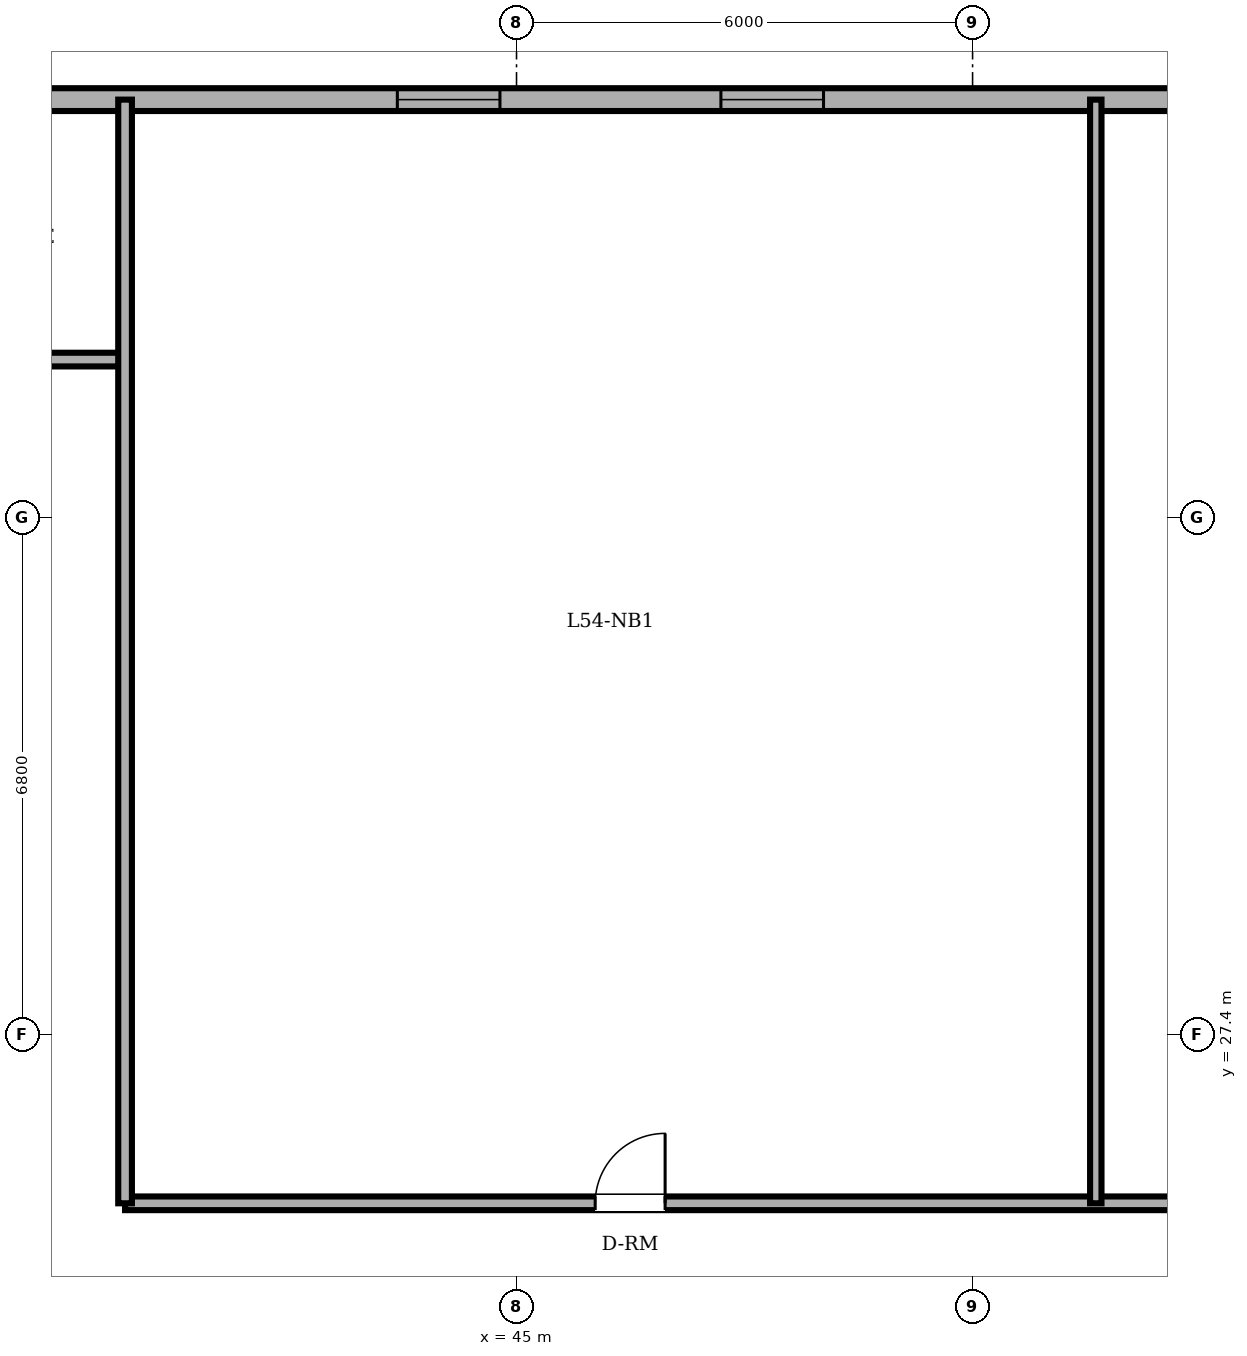
"""IFC4 building model, lengths in metres.
Left out: names, types, materials, properties, quantities, classifications, styles, units other than length and angle.
Written with IfcOpenShell. Run it as: python <this file> out.ifc"""

import sys

from ifc_helpers import new_model, si_unit, direction, frame, frame_2d, origin, place, context, subcontext, project, spatial, rectangle, extrude, element, fill, save


model = new_model("IFC4")
c1 = context("Model", 3, precision=1e-05, world=origin(), true_north=direction((0.0, 1.0)))
c2 = subcontext(c1, "Body", "Model", "MODEL_VIEW")
j1 = project(units=[si_unit("LENGTHUNIT", "METRE"), si_unit("PLANEANGLEUNIT", "RADIAN")], contexts=[c1])
p1 = place(None, origin())
s1 = spatial("IfcSite", under=j1, at=p1, CompositionType="ELEMENT")
p2 = place(p1, origin())
s2 = spatial("IfcBuilding", under=s1, at=p2, CompositionType="ELEMENT")
p3 = place(p2, frame((0.0, 0.0, 208.5)))
s3 = spatial("IfcBuildingStorey", under=s2, at=p3, CompositionType="ELEMENT", Elevation=208.5)
p4 = place(p3, frame((54.885, 39.7, 0.0), z_axis=(0.0, 0.0, 1.0), x_axis=(-1.0, 0.0, 0.0)))
e1 = element("IfcWall", 1, at=p4, inside=s3, PredefinedType="SOLIDWALL", context=c2, shape_type="SweptSolid", body=[
    extrude(rectangle(XDim=32.485, YDim=0.3, at=frame_2d((16.243, 0.0))), origin(), (0.0, 0.0, 1.0), 3.4),
])
p5 = place(p4, frame((27.01, 0.0, 0.0)))
e2 = element("IfcOpeningElement", 2, at=p5, cuts=e1, PredefinedType="OPENING", context=c2, shape_type="SweptSolid", body=[
    extrude(rectangle(XDim=0.95, YDim=2.2, at=frame_2d((0.475, 1.1))), frame((0.0, 0.16, 0.0), z_axis=(0.0, -1.0, 0.0), x_axis=(1.0, 0.0, 0.0)), (0.0, 0.0, 1.0), 0.32),
])
p6 = place(p4, frame((5.846, 0.0, 0.85)))
e3 = element("IfcOpeningElement", 3, at=p6, cuts=e1, PredefinedType="OPENING", context=c2, shape_type="SweptSolid", body=[
    extrude(rectangle(XDim=1.35, YDim=1.55, at=frame_2d((0.675, 0.775))), frame((0.0, 0.16, 0.0), z_axis=(0.0, -1.0, 0.0), x_axis=(1.0, 0.0, 0.0)), (0.0, 0.0, 1.0), 0.32),
])
p7 = place(p4, frame((10.103, 0.0, 0.85)))
e4 = element("IfcOpeningElement", 4, at=p7, cuts=e1, PredefinedType="OPENING", context=c2, shape_type="SweptSolid", body=[
    extrude(rectangle(XDim=1.35, YDim=1.55, at=frame_2d((0.675, 0.775))), frame((0.0, 0.16, 0.0), z_axis=(0.0, -1.0, 0.0), x_axis=(1.0, 0.0, 0.0)), (0.0, 0.0, 1.0), 0.32),
])
p8 = place(p4, frame((16.577, 0.0, 0.85)))
e5 = element("IfcOpeningElement", 5, at=p8, cuts=e1, PredefinedType="OPENING", context=c2, shape_type="SweptSolid", body=[
    extrude(rectangle(XDim=1.35, YDim=1.55, at=frame_2d((0.675, 0.775))), frame((0.0, 0.16, 0.0), z_axis=(0.0, -1.0, 0.0), x_axis=(1.0, 0.0, 0.0)), (0.0, 0.0, 1.0), 0.32),
])
p9 = place(p4, frame((18.793, 0.0, 0.85)))
e6 = element("IfcOpeningElement", 6, at=p9, cuts=e1, PredefinedType="OPENING", context=c2, shape_type="SweptSolid", body=[
    extrude(rectangle(XDim=1.35, YDim=1.55, at=frame_2d((0.675, 0.775))), frame((0.0, 0.16, 0.0), z_axis=(0.0, -1.0, 0.0), x_axis=(1.0, 0.0, 0.0)), (0.0, 0.0, 1.0), 0.32),
])
p10 = place(p4, frame((22.91, 0.0, 0.85)))
e7 = element("IfcOpeningElement", 7, at=p10, cuts=e1, PredefinedType="OPENING", context=c2, shape_type="SweptSolid", body=[
    extrude(rectangle(XDim=1.35, YDim=1.55, at=frame_2d((0.675, 0.775))), frame((0.0, 0.16, 0.0), z_axis=(0.0, -1.0, 0.0), x_axis=(1.0, 0.0, 0.0)), (0.0, 0.0, 1.0), 0.32),
])
p11 = place(p4, frame((29.835, 0.0, 0.85)))
e8 = element("IfcOpeningElement", 8, at=p11, cuts=e1, PredefinedType="OPENING", context=c2, shape_type="SweptSolid", body=[
    extrude(rectangle(XDim=1.35, YDim=1.55, at=frame_2d((0.675, 0.775))), frame((0.0, 0.16, 0.0), z_axis=(0.0, -1.0, 0.0), x_axis=(1.0, 0.0, 0.0)), (0.0, 0.0, 1.0), 0.32),
])
p12 = place(p3, frame((39.85, 25.18, 0.0), z_axis=(0.0, 0.0, 1.0), x_axis=(1.0, 0.0, 0.0)))
e9 = element("IfcWall", 9, at=p12, inside=s3, PredefinedType="PARTITIONING", context=c2, shape_type="SweptSolid", body=[
    extrude(rectangle(XDim=28.75, YDim=0.18, at=frame_2d((14.375, 0.0))), origin(), (0.0, 0.0, 1.0), 3.4),
])
p13 = place(p12, frame((6.185, 0.0, 0.0)))
e10 = element("IfcOpeningElement", 10, at=p13, cuts=e9, PredefinedType="OPENING", context=c2, shape_type="SweptSolid", body=[
    extrude(rectangle(XDim=0.92, YDim=2.1, at=frame_2d((0.46, 1.05))), frame((0.0, 0.1, 0.0), z_axis=(0.0, -1.0, 0.0), x_axis=(1.0, 0.0, 0.0)), (0.0, 0.0, 1.0), 0.2),
])
p14 = place(p12, frame((15.601, 0.0, 0.0)))
e11 = element("IfcOpeningElement", 11, at=p14, cuts=e9, PredefinedType="OPENING", context=c2, shape_type="SweptSolid", body=[
    extrude(rectangle(XDim=0.92, YDim=2.1, at=frame_2d((0.46, 1.05))), frame((0.0, 0.1, 0.0), z_axis=(0.0, -1.0, 0.0), x_axis=(1.0, 0.0, 0.0)), (0.0, 0.0, 1.0), 0.2),
])
p15 = place(p12, frame((21.15, 0.0, 0.0)))
e12 = element("IfcOpeningElement", 12, at=p15, cuts=e9, PredefinedType="OPENING", context=c2, shape_type="SweptSolid", body=[
    extrude(rectangle(XDim=1.0, YDim=2.15, at=frame_2d((0.5, 1.075))), frame((0.0, 0.1, 0.0), z_axis=(0.0, -1.0, 0.0), x_axis=(1.0, 0.0, 0.0)), (0.0, 0.0, 1.0), 0.2),
])
p16 = place(p3, frame((17.677, 36.28, 0.0), z_axis=(0.0, 0.0, 1.0), x_axis=(1.0, 0.0, 0.0)))
e13 = element("IfcWall", 13, at=p16, inside=s3, PredefinedType="PARTITIONING", context=c2, shape_type="SweptSolid", body=[
    extrude(rectangle(XDim=22.173, YDim=0.18, at=frame_2d((11.086, 0.0))), origin(), (0.0, 0.0, 1.0), 3.4),
])
p17 = place(p16, frame((9.573, 0.0, 0.0)))
e14 = element("IfcOpeningElement", 14, at=p17, cuts=e13, PredefinedType="OPENING", context=c2, shape_type="SweptSolid", body=[
    extrude(rectangle(XDim=0.9, YDim=2.1, at=frame_2d((0.45, 1.05))), frame((0.0, 0.1, 0.0), z_axis=(0.0, -1.0, 0.0), x_axis=(1.0, 0.0, 0.0)), (0.0, 0.0, 1.0), 0.2),
])
p18 = place(p16, frame((13.193, 0.0, 0.0)))
e15 = element("IfcOpeningElement", 15, at=p18, cuts=e13, PredefinedType="OPENING", context=c2, shape_type="SweptSolid", body=[
    extrude(rectangle(XDim=0.86, YDim=2.1, at=frame_2d((0.43, 1.05))), frame((0.0, 0.1, 0.0), z_axis=(0.0, -1.0, 0.0), x_axis=(1.0, 0.0, 0.0)), (0.0, 0.0, 1.0), 0.2),
])
p19 = place(p16, frame((4.063, 0.0, 0.0)))
e16 = element("IfcOpeningElement", 16, at=p19, cuts=e13, PredefinedType="OPENING", context=c2, shape_type="SweptSolid", body=[
    extrude(rectangle(XDim=0.92, YDim=2.1, at=frame_2d((0.46, 1.05))), frame((0.0, 0.1, 0.0), z_axis=(0.0, -1.0, 0.0), x_axis=(1.0, 0.0, 0.0)), (0.0, 0.0, 1.0), 0.2),
])
p20 = place(p16, frame((18.128, 0.0, 0.0)))
e17 = element("IfcOpeningElement", 17, at=p20, cuts=e13, PredefinedType="OPENING", context=c2, shape_type="SweptSolid", body=[
    extrude(rectangle(XDim=0.92, YDim=2.1, at=frame_2d((0.46, 1.05))), frame((0.0, 0.1, 0.0), z_axis=(0.0, -1.0, 0.0), x_axis=(1.0, 0.0, 0.0)), (0.0, 0.0, 1.0), 0.2),
])
p21 = place(p3, frame((39.85, 25.18, 0.0), z_axis=(0.0, 0.0, 1.0), x_axis=(0.0, 1.0, 0.0)))
e18 = element("IfcWall", 18, at=p21, inside=s3, PredefinedType="PARTITIONING", context=c2, shape_type="SweptSolid", body=[
    extrude(rectangle(XDim=14.52, YDim=0.18, at=frame_2d((7.26, 0.0))), origin(), (0.0, 0.0, 1.0), 3.4),
])
p22 = place(p3, frame((52.621, 25.18, 0.0), z_axis=(0.0, 0.0, 1.0), x_axis=(0.0, 1.0, 0.0)))
e19 = element("IfcWall", 19, at=p22, inside=s3, PredefinedType="PARTITIONING", context=c2, shape_type="SweptSolid", body=[
    extrude(rectangle(XDim=14.52, YDim=0.15, at=frame_2d((7.26, 0.0))), origin(), (0.0, 0.0, 1.0), 3.4),
])
p23 = place(p6, origin())
e20 = element("IfcWindow", 20, at=p23, inside=s3, PartitioningType="SINGLE_PANEL", PredefinedType="WINDOW", context=c2, shape_type="SweptSolid", body=[
    extrude(rectangle(XDim=1.35, YDim=1.55, at=frame_2d((0.675, 0.775))), frame((0.0, 0.03, 0.0), z_axis=(0.0, -1.0, 0.0), x_axis=(1.0, 0.0, 0.0)), (0.0, 0.0, 1.0), 0.06),
])
fill(e3, e20)
p24 = place(p7, origin())
e21 = element("IfcWindow", 21, at=p24, inside=s3, PartitioningType="SINGLE_PANEL", PredefinedType="WINDOW", context=c2, shape_type="SweptSolid", body=[
    extrude(rectangle(XDim=1.35, YDim=1.55, at=frame_2d((0.675, 0.775))), frame((0.0, 0.03, 0.0), z_axis=(0.0, -1.0, 0.0), x_axis=(1.0, 0.0, 0.0)), (0.0, 0.0, 1.0), 0.06),
])
fill(e4, e21)
p25 = place(p13, origin())
e22 = element("IfcDoor", 22, at=p25, inside=s3, OperationType="SINGLE_SWING_RIGHT", PredefinedType="DOOR", context=c2, shape_type="SweptSolid", body=[
    extrude(rectangle(XDim=0.92, YDim=2.1, at=frame_2d((0.46, 1.05))), frame((0.0, 0.025, 0.0), z_axis=(0.0, -1.0, 0.0), x_axis=(1.0, 0.0, 0.0)), (0.0, 0.0, 1.0), 0.05),
])
fill(e10, e22)
save(model, sys.argv[1])
